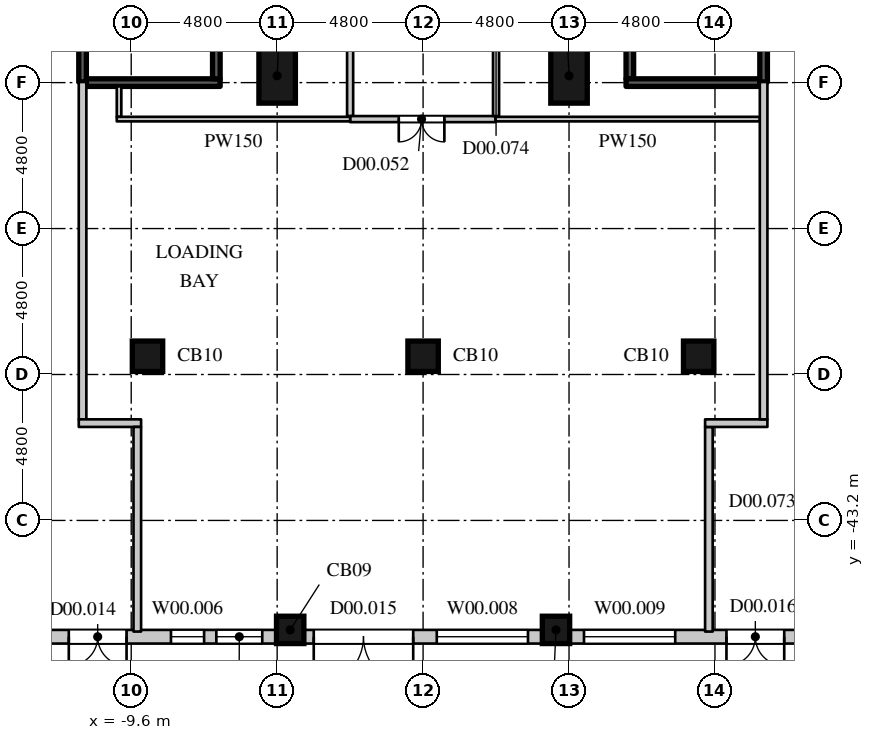
"""IFC4 building model, lengths in metres.
Left out: names, types, materials, properties, quantities, classifications, styles, units other than length and angle.
Written with IfcOpenShell. Run it as: python <this file> out.ifc"""

import sys

from ifc_helpers import new_model, si_unit, direction, frame, frame_2d, origin, origin_2d, place, context, subcontext, project, spatial, rectangle, extrude, element, fill, save


model = new_model("IFC4")
c1 = context("Model", 3, precision=1e-05, world=origin(), true_north=direction((0.0, 1.0)))
c2 = subcontext(c1, "Body", "Model", "MODEL_VIEW")
j1 = project(units=[si_unit("LENGTHUNIT", "METRE"), si_unit("PLANEANGLEUNIT", "RADIAN")], contexts=[c1])
p1 = place(None, origin())
s1 = spatial("IfcSite", under=j1, at=p1, CompositionType="ELEMENT")
p2 = place(p1, origin())
s2 = spatial("IfcBuilding", under=s1, at=p2, CompositionType="ELEMENT")
p3 = place(p2, origin())
s3 = spatial("IfcBuildingStorey", under=s2, at=p3, CompositionType="ELEMENT", Elevation=0.0)
for number, where, z_axis, x_axis in (
    (1, (-4.371, -46.8, 0.0), (0.0, 0.0, 1.0), (1.0, 0.0, 0.0)),
    (2, (4.371, -46.8, 0.0), (0.0, 0.0, 1.0), (1.0, 0.0, 0.0)),
):
    element("IfcColumn", number, at=place(p3, frame(where, z_axis=z_axis, x_axis=x_axis)), inside=s3, PredefinedType="COLUMN", context=c2, shape_type="SweptSolid", body=[
        extrude(rectangle(XDim=0.9, YDim=0.9, at=origin_2d()), origin(), (0.0, 0.0, 1.0), 6.0),
    ])
for number, where, z_axis, x_axis in (
    (3, (-9.064, -37.8, 0.0), (0.0, 0.0, 1.0), (1.0, 0.0, 0.0)),
    (4, (0.0, -37.8, 0.0), (0.0, 0.0, 1.0), (1.0, 0.0, 0.0)),
    (5, (9.064, -37.8, 0.0), (0.0, 0.0, 1.0), (1.0, 0.0, 0.0)),
):
    element("IfcColumn", number, at=place(p3, frame(where, z_axis=z_axis, x_axis=x_axis)), inside=s3, PredefinedType="COLUMN", context=c2, shape_type="SweptSolid", body=[
        extrude(rectangle(XDim=1.0, YDim=1.0, at=origin_2d()), origin(), (0.0, 0.0, 1.0), 6.0),
    ])
for number, where, z_axis, x_axis in (
    (6, (-4.8, -28.575, 0.0), (0.0, 0.0, 1.0), (1.0, 0.0, 0.0)),
    (7, (4.8, -28.575, 0.0), (0.0, 0.0, 1.0), (1.0, 0.0, 0.0)),
):
    element("IfcColumn", number, at=place(p3, frame(where, z_axis=z_axis, x_axis=x_axis)), inside=s3, PredefinedType="COLUMN", context=c2, shape_type="SweptSolid", body=[
        extrude(rectangle(XDim=1.2, YDim=1.8, at=origin_2d()), origin(), (0.0, 0.0, 1.0), 6.0),
    ])
p4 = place(p3, frame((-12.664, -47.025, 0.0), z_axis=(0.0, 0.0, 1.0), x_axis=(1.0, 0.0, 0.0)))
e8 = element("IfcWall", 8, at=p4, inside=s3, PredefinedType="ELEMENTEDWALL", context=c2, shape_type="SweptSolid", body=[
    extrude(rectangle(XDim=7.842, YDim=0.45, at=frame_2d((3.921, 0.0))), origin(), (0.0, 0.0, 1.0), 4.8),
])
p5 = place(p4, frame((1.01, 0.0, 0.0)))
e9 = element("IfcOpeningElement", 9, at=p5, cuts=e8, PredefinedType="OPENING", context=c2, shape_type="SweptSolid", body=[
    extrude(rectangle(XDim=1.9, YDim=2.7, at=frame_2d((0.95, 1.35))), frame((0.0, 0.235, 0.0), z_axis=(0.0, -1.0, 0.0), x_axis=(1.0, 0.0, 0.0)), (0.0, 0.0, 1.0), 0.47),
])
p6 = place(p4, frame((4.371, 0.0, 1.05)))
e10 = element("IfcOpeningElement", 10, at=p6, cuts=e8, PredefinedType="OPENING", context=c2, shape_type="SweptSolid", body=[
    extrude(rectangle(XDim=1.09, YDim=2.7, at=frame_2d((0.545, 1.35))), frame((0.0, 0.235, 0.0), z_axis=(0.0, -1.0, 0.0), x_axis=(1.0, 0.0, 0.0)), (0.0, 0.0, 1.0), 0.47),
])
p7 = place(p4, frame((5.864, 0.0, 1.05)))
e11 = element("IfcOpeningElement", 11, at=p7, cuts=e8, PredefinedType="OPENING", context=c2, shape_type="SweptSolid", body=[
    extrude(rectangle(XDim=1.51, YDim=2.7, at=frame_2d((0.755, 1.35))), frame((0.0, 0.235, 0.0), z_axis=(0.0, -1.0, 0.0), x_axis=(1.0, 0.0, 0.0)), (0.0, 0.0, 1.0), 0.47),
])
p8 = place(p3, frame((-3.921, -47.025, 0.0), z_axis=(0.0, 0.0, 1.0), x_axis=(1.0, 0.0, 0.0)))
e12 = element("IfcWall", 12, at=p8, inside=s3, PredefinedType="ELEMENTEDWALL", context=c2, shape_type="SweptSolid", body=[
    extrude(rectangle(XDim=7.842, YDim=0.45, at=frame_2d((3.921, 0.0))), origin(), (0.0, 0.0, 1.0), 4.8),
])
p9 = place(p8, frame((0.325, 0.0, 0.0)))
e13 = element("IfcOpeningElement", 13, at=p9, cuts=e12, PredefinedType="OPENING", context=c2, shape_type="SweptSolid", body=[
    extrude(rectangle(XDim=3.271, YDim=2.7, at=frame_2d((1.635, 1.35))), frame((0.0, 0.235, 0.0), z_axis=(0.0, -1.0, 0.0), x_axis=(1.0, 0.0, 0.0)), (0.0, 0.0, 1.0), 0.47),
])
p10 = place(p8, frame((4.371, 0.0, 1.05)))
e14 = element("IfcOpeningElement", 14, at=p10, cuts=e12, PredefinedType="OPENING", context=c2, shape_type="SweptSolid", body=[
    extrude(rectangle(XDim=3.0, YDim=2.7, at=frame_2d((1.5, 1.35))), frame((0.0, 0.235, 0.0), z_axis=(0.0, -1.0, 0.0), x_axis=(1.0, 0.0, 0.0)), (0.0, 0.0, 1.0), 0.47),
])
p11 = place(p3, frame((4.821, -47.025, 0.0), z_axis=(0.0, 0.0, 1.0), x_axis=(1.0, 0.0, 0.0)))
e15 = element("IfcWall", 15, at=p11, inside=s3, PredefinedType="ELEMENTEDWALL", context=c2, shape_type="SweptSolid", body=[
    extrude(rectangle(XDim=7.842, YDim=0.45, at=frame_2d((3.921, 0.0))), origin(), (0.0, 0.0, 1.0), 4.8),
])
p12 = place(p11, frame((0.471, 0.0, 1.05)))
e16 = element("IfcOpeningElement", 16, at=p12, cuts=e15, PredefinedType="OPENING", context=c2, shape_type="SweptSolid", body=[
    extrude(rectangle(XDim=3.0, YDim=2.7, at=frame_2d((1.5, 1.35))), frame((0.0, 0.235, 0.0), z_axis=(0.0, -1.0, 0.0), x_axis=(1.0, 0.0, 0.0)), (0.0, 0.0, 1.0), 0.47),
])
p13 = place(p11, frame((5.157, 0.0, 0.0)))
e17 = element("IfcOpeningElement", 17, at=p13, cuts=e15, PredefinedType="OPENING", context=c2, shape_type="SweptSolid", body=[
    extrude(rectangle(XDim=1.9, YDim=2.7, at=frame_2d((0.95, 1.35))), frame((0.0, 0.235, 0.0), z_axis=(0.0, -1.0, 0.0), x_axis=(1.0, 0.0, 0.0)), (0.0, 0.0, 1.0), 0.47),
])
p14 = place(p3, frame((-2.4, -29.9, 0.0), z_axis=(0.0, 0.0, 1.0), x_axis=(0.0, 1.0, 0.0)))
e18 = element("IfcWall", 18, at=p14, inside=s3, PredefinedType="PARTITIONING", context=c2, shape_type="SweptSolid", body=[
    extrude(rectangle(XDim=13.825, YDim=0.2, at=frame_2d((6.913, 0.0))), origin(), (0.0, 0.0, 1.0), 5.65),
])
p15 = place(p14, frame((6.45, 0.0, 0.0)))
e19 = element("IfcOpeningElement", 19, at=p15, cuts=e18, PredefinedType="OPENING", context=c2, shape_type="SweptSolid", body=[
    extrude(rectangle(XDim=0.9, YDim=2.2, at=frame_2d((0.45, 1.1))), frame((0.0, 0.11, 0.0), z_axis=(0.0, -1.0, 0.0), x_axis=(1.0, 0.0, 0.0)), (0.0, 0.0, 1.0), 0.22),
])
p16 = place(p3, frame((-2.4, -30.0, 0.0), z_axis=(0.0, 0.0, 1.0), x_axis=(1.0, 0.0, 0.0)))
e20 = element("IfcWall", 20, at=p16, inside=s3, PredefinedType="PARTITIONING", context=c2, shape_type="SweptSolid", body=[
    extrude(rectangle(XDim=4.78, YDim=0.2, at=frame_2d((2.39, 0.0))), origin(), (0.0, 0.0, 1.0), 5.65),
])
p17 = place(p16, frame((1.6, 0.0, 0.0)))
e21 = element("IfcOpeningElement", 21, at=p17, cuts=e20, PredefinedType="OPENING", context=c2, shape_type="SweptSolid", body=[
    extrude(rectangle(XDim=1.5, YDim=2.2, at=frame_2d((0.75, 1.1))), frame((0.0, 0.11, 0.0), z_axis=(0.0, -1.0, 0.0), x_axis=(1.0, 0.0, 0.0)), (0.0, 0.0, 1.0), 0.22),
])
p18 = place(p3, frame((2.4, -29.9, 0.0), z_axis=(0.0, 0.0, 1.0), x_axis=(0.0, 1.0, 0.0)))
e22 = element("IfcWall", 22, at=p18, inside=s3, PredefinedType="PARTITIONING", context=c2, shape_type="SweptSolid", body=[
    extrude(rectangle(XDim=13.825, YDim=0.2, at=frame_2d((6.913, 0.0))), origin(), (0.0, 0.0, 1.0), 5.65),
])
p19 = place(p18, frame((6.45, 0.0, 0.0)))
e23 = element("IfcOpeningElement", 23, at=p19, cuts=e22, PredefinedType="OPENING", context=c2, shape_type="SweptSolid", body=[
    extrude(rectangle(XDim=0.9, YDim=2.2, at=frame_2d((0.45, 1.1))), frame((0.0, 0.11, 0.0), z_axis=(0.0, -1.0, 0.0), x_axis=(1.0, 0.0, 0.0)), (0.0, 0.0, 1.0), 0.22),
])
p20 = place(p3, frame((-10.0, -29.925, 0.0), z_axis=(0.0, 0.0, 1.0), x_axis=(0.0, 1.0, 0.0)))
e24 = element("IfcWall", 24, at=p20, inside=s3, PredefinedType="PARTITIONING", context=c2, shape_type="SweptSolid", body=[
    extrude(rectangle(XDim=1.0, YDim=0.15, at=frame_2d((0.5, 0.0))), origin(), (0.0, 0.0, 1.0), 5.65),
])
p21 = place(p3, frame((-10.075, -30.0, 0.0), z_axis=(0.0, 0.0, 1.0), x_axis=(1.0, 0.0, 0.0)))
e25 = element("IfcWall", 25, at=p21, inside=s3, PredefinedType="PARTITIONING", context=c2, shape_type="SweptSolid", body=[
    extrude(rectangle(XDim=7.675, YDim=0.15, at=frame_2d((3.837, 0.0))), origin(), (0.0, 0.0, 1.0), 5.65),
])
p22 = place(p3, frame((2.38, -30.0, 0.0), z_axis=(0.0, 0.0, 1.0), x_axis=(1.0, 0.0, 0.0)))
e26 = element("IfcWall", 26, at=p22, inside=s3, PredefinedType="PARTITIONING", context=c2, shape_type="SweptSolid", body=[
    extrude(rectangle(XDim=8.695, YDim=0.15, at=frame_2d((4.348, 0.0))), origin(), (0.0, 0.0, 1.0), 5.65),
])
p23 = place(p3, frame((-11.2, -28.78, 0.0), z_axis=(0.0, 0.0, 1.0), x_axis=(0.0, 1.0, 0.0)))
e27 = element("IfcWall", 27, at=p23, inside=s3, PredefinedType="SHEAR", context=c2, shape_type="SweptSolid", body=[
    extrude(rectangle(XDim=10.38, YDim=0.25, at=frame_2d((5.19, 0.0))), origin(), (0.0, 0.0, 1.0), 5.65),
])
p24 = place(p23, frame((8.65, 0.0, 0.0)))
e28 = element("IfcOpeningElement", 28, at=p24, cuts=e27, PredefinedType="OPENING", context=c2, shape_type="SweptSolid", body=[
    extrude(rectangle(XDim=1.1, YDim=2.2, at=frame_2d((0.55, 1.1))), frame((0.0, 0.135, 0.0), z_axis=(0.0, -1.0, 0.0), x_axis=(1.0, 0.0, 0.0)), (0.0, 0.0, 1.0), 0.27),
])
p25 = place(p3, frame((-11.075, -28.8, 0.0), z_axis=(0.0, 0.0, 1.0), x_axis=(1.0, 0.0, 0.0)))
e29 = element("IfcWall", 29, at=p25, inside=s3, PredefinedType="SHEAR", context=c2, shape_type="SweptSolid", body=[
    extrude(rectangle(XDim=4.4, YDim=0.25, at=frame_2d((2.2, 0.0))), origin(), (0.0, 0.0, 1.0), 5.65),
])
for number, where, z_axis, x_axis in (
    (30, (-6.8, -28.675, 0.0), (0.0, 0.0, 1.0), (0.0, 1.0, 0.0)),
    (31, (6.8, -28.675, 0.0), (0.0, 0.0, 1.0), (0.0, 1.0, 0.0)),
):
    element("IfcWall", number, at=place(p3, frame(where, z_axis=z_axis, x_axis=x_axis)), inside=s3, PredefinedType="SHEAR", context=c2, shape_type="SweptSolid", body=[
        extrude(rectangle(XDim=10.275, YDim=0.25, at=frame_2d((5.138, 0.0))), origin(), (0.0, 0.0, 1.0), 5.65),
    ])
p26 = place(p3, frame((6.675, -28.8, 0.0), z_axis=(0.0, 0.0, 1.0), x_axis=(1.0, 0.0, 0.0)))
e32 = element("IfcWall", 32, at=p26, inside=s3, PredefinedType="SHEAR", context=c2, shape_type="SweptSolid", body=[
    extrude(rectangle(XDim=4.4, YDim=0.25, at=frame_2d((2.2, 0.0))), origin(), (0.0, 0.0, 1.0), 5.65),
])
p27 = place(p3, frame((11.2, -28.78, 0.0), z_axis=(0.0, 0.0, 1.0), x_axis=(0.0, 1.0, 0.0)))
e33 = element("IfcWall", 33, at=p27, inside=s3, PredefinedType="SHEAR", context=c2, shape_type="SweptSolid", body=[
    extrude(rectangle(XDim=10.38, YDim=0.25, at=frame_2d((5.19, 0.0))), origin(), (0.0, 0.0, 1.0), 5.65),
])
p28 = place(p27, frame((8.65, 0.0, 0.0)))
e34 = element("IfcOpeningElement", 34, at=p28, cuts=e33, PredefinedType="OPENING", context=c2, shape_type="SweptSolid", body=[
    extrude(rectangle(XDim=1.1, YDim=2.2, at=frame_2d((0.55, 1.1))), frame((0.0, 0.135, 0.0), z_axis=(0.0, -1.0, 0.0), x_axis=(1.0, 0.0, 0.0)), (0.0, 0.0, 1.0), 0.27),
])
p29 = place(p3, frame((-11.2, -39.875, 0.0), z_axis=(0.0, 0.0, 1.0), x_axis=(0.0, 1.0, 0.0)))
e35 = element("IfcWall", 35, at=p29, inside=s3, PredefinedType="PARTITIONING", context=c2, shape_type="SweptSolid", body=[
    extrude(rectangle(XDim=11.095, YDim=0.25, at=frame_2d((5.547, 0.0))), origin(), (0.0, 0.0, 1.0), 5.65),
])
p30 = place(p3, frame((-11.325, -40.0, 0.0), z_axis=(0.0, 0.0, 1.0), x_axis=(1.0, 0.0, 0.0)))
e36 = element("IfcWall", 36, at=p30, inside=s3, PredefinedType="PARTITIONING", context=c2, shape_type="SweptSolid", body=[
    extrude(rectangle(XDim=2.05, YDim=0.25, at=frame_2d((1.025, 0.0))), origin(), (0.0, 0.0, 1.0), 5.65),
])
for number, where, z_axis, x_axis in (
    (37, (-9.4, -46.855, 0.0), (0.0, 0.0, 1.0), (0.0, 1.0, 0.0)),
    (38, (9.4, -46.855, 0.0), (0.0, 0.0, 1.0), (0.0, 1.0, 0.0)),
):
    element("IfcWall", number, at=place(p3, frame(where, z_axis=z_axis, x_axis=x_axis)), inside=s3, PredefinedType="PARTITIONING", context=c2, shape_type="SweptSolid", body=[
        extrude(rectangle(XDim=6.73, YDim=0.25, at=frame_2d((3.365, 0.0))), origin(), (0.0, 0.0, 1.0), 5.65),
    ])
p31 = place(p3, frame((9.275, -40.0, 0.0), z_axis=(0.0, 0.0, 1.0), x_axis=(1.0, 0.0, 0.0)))
e39 = element("IfcWall", 39, at=p31, inside=s3, PredefinedType="PARTITIONING", context=c2, shape_type="SweptSolid", body=[
    extrude(rectangle(XDim=2.05, YDim=0.25, at=frame_2d((1.025, 0.0))), origin(), (0.0, 0.0, 1.0), 5.65),
])
p32 = place(p3, frame((11.2, -39.875, 0.0), z_axis=(0.0, 0.0, 1.0), x_axis=(0.0, 1.0, 0.0)))
e40 = element("IfcWall", 40, at=p32, inside=s3, PredefinedType="PARTITIONING", context=c2, shape_type="SweptSolid", body=[
    extrude(rectangle(XDim=11.095, YDim=0.25, at=frame_2d((5.547, 0.0))), origin(), (0.0, 0.0, 1.0), 5.65),
])
p33 = place(p5, frame((1.9, 0.0, 0.0), z_axis=(0.0, 0.0, 1.0), x_axis=(-1.0, 0.0, 0.0)))
e41 = element("IfcDoor", 41, at=p33, inside=s3, OperationType="DOUBLE_DOOR_SINGLE_SWING", PredefinedType="DOOR", context=c2, shape_type="SweptSolid", body=[
    extrude(rectangle(XDim=1.9, YDim=2.7, at=frame_2d((0.95, 1.35))), frame((0.0, -0.08, 0.0), z_axis=(0.0, -1.0, 0.0), x_axis=(1.0, 0.0, 0.0)), (0.0, 0.0, 1.0), 0.05),
])
fill(e9, e41)
p34 = place(p6, origin())
e42 = element("IfcWindow", 42, at=p34, inside=s3, PartitioningType="SINGLE_PANEL", PredefinedType="WINDOW", context=c2, shape_type="SweptSolid", body=[
    extrude(rectangle(XDim=1.09, YDim=2.7, at=frame_2d((0.545, 1.35))), frame((0.0, 0.135, 0.0), z_axis=(0.0, -1.0, 0.0), x_axis=(1.0, 0.0, 0.0)), (0.0, 0.0, 1.0), 0.06),
])
fill(e10, e42)
p35 = place(p7, origin())
e43 = element("IfcWindow", 43, at=p35, inside=s3, PartitioningType="SINGLE_PANEL", PredefinedType="WINDOW", context=c2, shape_type="SweptSolid", body=[
    extrude(rectangle(XDim=1.51, YDim=2.7, at=frame_2d((0.755, 1.35))), frame((0.0, 0.135, 0.0), z_axis=(0.0, -1.0, 0.0), x_axis=(1.0, 0.0, 0.0)), (0.0, 0.0, 1.0), 0.06),
])
fill(e11, e43)
p36 = place(p9, frame((3.271, 0.0, 0.0), z_axis=(0.0, 0.0, 1.0), x_axis=(-1.0, 0.0, 0.0)))
e44 = element("IfcDoor", 44, at=p36, inside=s3, OperationType="DOUBLE_DOOR_SINGLE_SWING", PredefinedType="DOOR", context=c2, shape_type="SweptSolid", body=[
    extrude(rectangle(XDim=3.271, YDim=2.7, at=frame_2d((1.635, 1.35))), frame((0.0, -0.08, 0.0), z_axis=(0.0, -1.0, 0.0), x_axis=(1.0, 0.0, 0.0)), (0.0, 0.0, 1.0), 0.05),
])
fill(e13, e44)
p37 = place(p10, origin())
e45 = element("IfcWindow", 45, at=p37, inside=s3, PartitioningType="SINGLE_PANEL", PredefinedType="WINDOW", context=c2, shape_type="SweptSolid", body=[
    extrude(rectangle(XDim=3.0, YDim=2.7, at=frame_2d((1.5, 1.35))), frame((0.0, 0.135, 0.0), z_axis=(0.0, -1.0, 0.0), x_axis=(1.0, 0.0, 0.0)), (0.0, 0.0, 1.0), 0.06),
])
fill(e14, e45)
p38 = place(p12, origin())
e46 = element("IfcWindow", 46, at=p38, inside=s3, PartitioningType="SINGLE_PANEL", PredefinedType="WINDOW", context=c2, shape_type="SweptSolid", body=[
    extrude(rectangle(XDim=3.0, YDim=2.7, at=frame_2d((1.5, 1.35))), frame((0.0, 0.135, 0.0), z_axis=(0.0, -1.0, 0.0), x_axis=(1.0, 0.0, 0.0)), (0.0, 0.0, 1.0), 0.06),
])
fill(e16, e46)
p39 = place(p13, frame((1.9, 0.0, 0.0), z_axis=(0.0, 0.0, 1.0), x_axis=(-1.0, 0.0, 0.0)))
e47 = element("IfcDoor", 47, at=p39, inside=s3, OperationType="DOUBLE_DOOR_SINGLE_SWING", PredefinedType="DOOR", context=c2, shape_type="SweptSolid", body=[
    extrude(rectangle(XDim=1.9, YDim=2.7, at=frame_2d((0.95, 1.35))), frame((0.0, -0.08, 0.0), z_axis=(0.0, -1.0, 0.0), x_axis=(1.0, 0.0, 0.0)), (0.0, 0.0, 1.0), 0.05),
])
fill(e17, e47)
p40 = place(p17, origin())
e48 = element("IfcDoor", 48, at=p40, inside=s3, OperationType="DOUBLE_DOOR_SINGLE_SWING", PredefinedType="DOOR", context=c2, shape_type="SweptSolid", body=[
    extrude(rectangle(XDim=1.5, YDim=2.2, at=frame_2d((0.75, 1.1))), frame((0.0, 0.025, 0.0), z_axis=(0.0, -1.0, 0.0), x_axis=(1.0, 0.0, 0.0)), (0.0, 0.0, 1.0), 0.05),
])
fill(e21, e48)
save(model, sys.argv[1])
